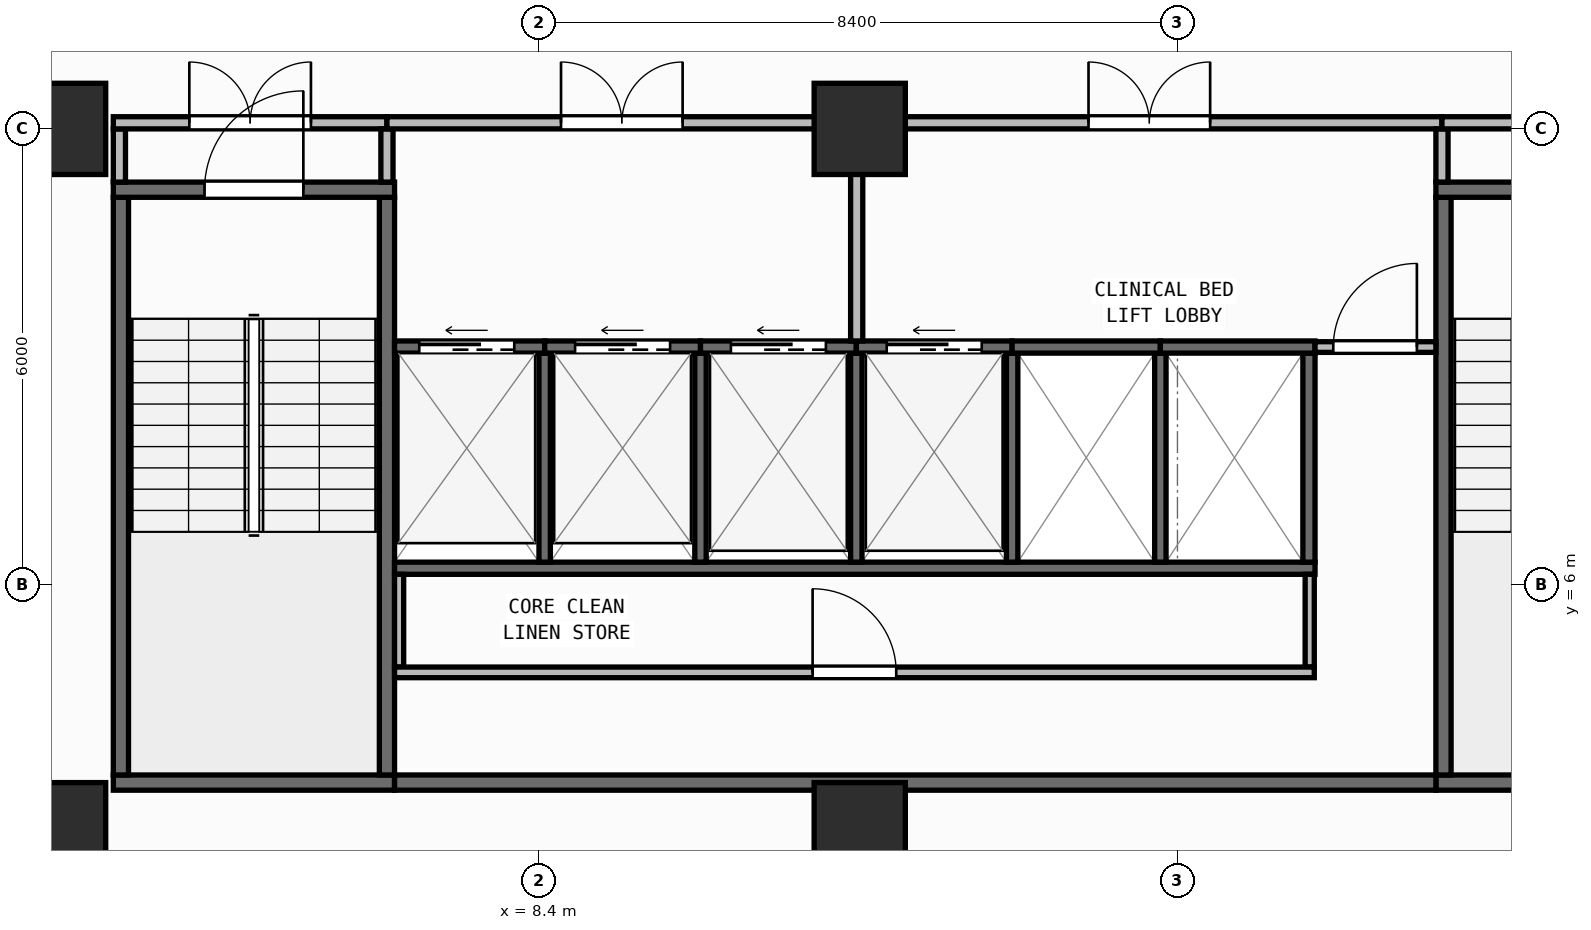
"""IFC4 building model, lengths in metres.
Left out: names, types, materials, properties, quantities, classifications, styles, units other than length and angle.
Written with IfcOpenShell. Run it as: python <this file> out.ifc"""

import sys

from ifc_helpers import new_model, si_unit, direction, frame, frame_2d, origin, origin_2d, place, context, subcontext, project, spatial, rectangle, extrude, element, fill, save


model = new_model("IFC4")
c1 = context("Model", 3, precision=1e-05, world=origin(), true_north=direction((0.0, 1.0)))
c2 = subcontext(c1, "Body", "Model", "MODEL_VIEW")
j1 = project(units=[si_unit("LENGTHUNIT", "METRE"), si_unit("PLANEANGLEUNIT", "RADIAN")], contexts=[c1])
p1 = place(None, origin())
s1 = spatial("IfcSite", under=j1, at=p1, CompositionType="ELEMENT")
p2 = place(p1, origin())
s2 = spatial("IfcBuilding", under=s1, at=p2, CompositionType="ELEMENT")
p3 = place(p2, frame((0.0, 0.0, 111.25)))
s3 = spatial("IfcBuildingStorey", under=s2, at=p3, CompositionType="ELEMENT", Elevation=111.25)
for number, where, z_axis, x_axis in (
    (1, (2.1, 2.8, 0.0), (0.0, 0.0, 1.0), (1.0, 0.0, 0.0)),
    (2, (12.62, 2.8, 0.0), (0.0, 0.0, 1.0), (1.0, 0.0, 0.0)),
    (3, (2.1, 12.0, 0.0), (0.0, 0.0, 1.0), (1.0, 0.0, 0.0)),
    (4, (12.62, 12.0, 0.0), (0.0, 0.0, 1.0), (1.0, 0.0, 0.0)),
):
    element("IfcColumn", number, at=place(p3, frame(where, z_axis=z_axis, x_axis=x_axis)), inside=s3, PredefinedType="COLUMN", context=c2, shape_type="SweptSolid", body=[
        extrude(rectangle(XDim=1.2, YDim=1.2, at=origin_2d()), origin(), (0.0, 0.0, 1.0), 3.95),
    ])
p4 = place(p3, frame((2.76, 0.173, 0.0), z_axis=(0.0, 0.0, 1.0), x_axis=(0.996857931723, 0.079210251617, 0.0)))
e5 = element("IfcWall", 5, at=p4, inside=s3, PredefinedType="STANDARD", context=c2, shape_type="SweptSolid", body=[
    extrude(rectangle(XDim=51.442, YDim=0.26, at=frame_2d((25.721, 0.0))), origin(), (0.0, 0.0, 1.0), 3.71),
])
p5 = place(p4, frame((24.521, 0.0, 0.9)))
e6 = element("IfcOpeningElement", 6, at=p5, cuts=e5, PredefinedType="OPENING", context=c2, shape_type="SweptSolid", body=[
    extrude(rectangle(XDim=2.4, YDim=1.65, at=frame_2d((1.2, 0.825))), frame((0.0, 0.14, 0.0), z_axis=(0.0, -1.0, 0.0), x_axis=(1.0, 0.0, 0.0)), (0.0, 0.0, 1.0), 0.28),
])
p6 = place(p3, frame((2.8, 3.4, 0.0), z_axis=(0.0, 0.0, 1.0), x_axis=(1.0, 0.0, 0.0)))
e7 = element("IfcWall", 7, at=p6, inside=s3, PredefinedType="SHEAR", context=c2, shape_type="SweptSolid", body=[
    extrude(rectangle(XDim=3.7, YDim=0.2, at=frame_2d((1.85, 0.0))), origin(), (0.0, 0.0, 1.0), 3.71),
])
for number, where, z_axis, x_axis in (
    (8, (2.9, 3.5, 0.0), (0.0, 0.0, 1.0), (0.0, 1.0, 0.0)),
    (9, (6.4, 3.5, 0.0), (0.0, 0.0, 1.0), (0.0, 1.0, 0.0)),
):
    element("IfcWall", number, at=place(p3, frame(where, z_axis=z_axis, x_axis=x_axis)), inside=s3, PredefinedType="SHEAR", context=c2, shape_type="SweptSolid", body=[
        extrude(rectangle(XDim=7.6, YDim=0.2, at=frame_2d((3.8, 0.0))), origin(), (0.0, 0.0, 1.0), 3.71),
    ])
p7 = place(p3, frame((2.8, 11.2, 0.0), z_axis=(0.0, 0.0, 1.0), x_axis=(1.0, 0.0, 0.0)))
e10 = element("IfcWall", 10, at=p7, inside=s3, PredefinedType="SHEAR", context=c2, shape_type="SweptSolid", body=[
    extrude(rectangle(XDim=3.7, YDim=0.2, at=frame_2d((1.85, 0.0))), origin(), (0.0, 0.0, 1.0), 3.71),
])
p8 = place(p7, frame((1.2, 0.0, 0.0)))
e11 = element("IfcOpeningElement", 11, at=p8, cuts=e10, PredefinedType="OPENING", context=c2, shape_type="SweptSolid", body=[
    extrude(rectangle(XDim=1.3, YDim=2.15, at=frame_2d((0.65, 1.075))), frame((0.0, 0.11, 0.0), z_axis=(0.0, -1.0, 0.0), x_axis=(1.0, 0.0, 0.0)), (0.0, 0.0, 1.0), 0.22),
])
p9 = place(p3, frame((20.2, 3.4, 0.0), z_axis=(0.0, 0.0, 1.0), x_axis=(1.0, 0.0, 0.0)))
e12 = element("IfcWall", 12, at=p9, inside=s3, PredefinedType="SHEAR", context=c2, shape_type="SweptSolid", body=[
    extrude(rectangle(XDim=3.7, YDim=0.2, at=frame_2d((1.85, 0.0))), origin(), (0.0, 0.0, 1.0), 3.71),
])
p10 = place(p3, frame((20.3, 3.5, 0.0), z_axis=(0.0, 0.0, 1.0), x_axis=(0.0, 1.0, 0.0)))
e13 = element("IfcWall", 13, at=p10, inside=s3, PredefinedType="SHEAR", context=c2, shape_type="SweptSolid", body=[
    extrude(rectangle(XDim=7.6, YDim=0.2, at=frame_2d((3.8, 0.0))), origin(), (0.0, 0.0, 1.0), 3.71),
])
p11 = place(p3, frame((20.2, 11.2, 0.0), z_axis=(0.0, 0.0, 1.0), x_axis=(1.0, 0.0, 0.0)))
e14 = element("IfcWall", 14, at=p11, inside=s3, PredefinedType="SHEAR", context=c2, shape_type="SweptSolid", body=[
    extrude(rectangle(XDim=3.7, YDim=0.2, at=frame_2d((1.85, 0.0))), origin(), (0.0, 0.0, 1.0), 3.71),
])
p12 = place(p11, frame((1.2, 0.0, 0.0)))
e15 = element("IfcOpeningElement", 15, at=p12, cuts=e14, PredefinedType="OPENING", context=c2, shape_type="SweptSolid", body=[
    extrude(rectangle(XDim=1.3, YDim=2.15, at=frame_2d((0.65, 1.075))), frame((0.0, 0.11, 0.0), z_axis=(0.0, -1.0, 0.0), x_axis=(1.0, 0.0, 0.0)), (0.0, 0.0, 1.0), 0.22),
])
p13 = place(p3, frame((6.5, 3.4, 0.0), z_axis=(0.0, 0.0, 1.0), x_axis=(1.0, 0.0, 0.0)))
e16 = element("IfcWall", 16, at=p13, inside=s3, PredefinedType="SHEAR", context=c2, shape_type="SweptSolid", body=[
    extrude(rectangle(XDim=13.7, YDim=0.2, at=frame_2d((6.85, 0.0))), origin(), (0.0, 0.0, 1.0), 3.71),
])
p14 = place(p3, frame((6.5, 6.22, 0.0), z_axis=(0.0, 0.0, 1.0), x_axis=(1.0, 0.0, 0.0)))
e17 = element("IfcWall", 17, at=p14, inside=s3, PredefinedType="SHEAR", context=c2, shape_type="SweptSolid", body=[
    extrude(rectangle(XDim=12.11, YDim=0.16, at=frame_2d((6.055, 0.0))), origin(), (0.0, 0.0, 1.0), 3.71),
])
p15 = place(p3, frame((18.53, 6.3, 0.0), z_axis=(0.0, 0.0, 1.0), x_axis=(0.0, 1.0, 0.0)))
e18 = element("IfcWall", 18, at=p15, inside=s3, PredefinedType="SHEAR", context=c2, shape_type="SweptSolid", body=[
    extrude(rectangle(XDim=2.75, YDim=0.16, at=frame_2d((1.375, 0.0))), origin(), (0.0, 0.0, 1.0), 3.71),
])
for number, where, z_axis, x_axis in (
    (19, (8.475, 6.3, 0.0), (0.0, 0.0, 1.0), (0.0, 1.0, 0.0)),
    (20, (10.525, 6.3, 0.0), (0.0, 0.0, 1.0), (0.0, 1.0, 0.0)),
    (21, (12.575, 6.3, 0.0), (0.0, 0.0, 1.0), (0.0, 1.0, 0.0)),
    (22, (14.625, 6.3, 0.0), (0.0, 0.0, 1.0), (0.0, 1.0, 0.0)),
    (23, (16.575, 6.3, 0.0), (0.0, 0.0, 1.0), (0.0, 1.0, 0.0)),
):
    element("IfcWall", number, at=place(p3, frame(where, z_axis=z_axis, x_axis=x_axis)), inside=s3, PredefinedType="SHEAR", context=c2, shape_type="SweptSolid", body=[
        extrude(rectangle(XDim=2.75, YDim=0.15, at=frame_2d((1.375, 0.0))), origin(), (0.0, 0.0, 1.0), 3.71),
    ])
p16 = place(p3, frame((6.5, 9.13, 0.0), z_axis=(0.0, 0.0, 1.0), x_axis=(1.0, 0.0, 0.0)))
e24 = element("IfcWall", 24, at=p16, inside=s3, PredefinedType="SHEAR", context=c2, shape_type="SweptSolid", body=[
    extrude(rectangle(XDim=1.975, YDim=0.16, at=frame_2d((0.988, 0.0))), origin(), (0.0, 0.0, 1.0), 3.71),
])
p17 = place(p16, frame((0.325, 0.0, 0.0)))
e25 = element("IfcOpeningElement", 25, at=p17, cuts=e24, PredefinedType="OPENING", context=c2, shape_type="SweptSolid", body=[
    extrude(rectangle(XDim=1.25, YDim=2.15, at=frame_2d((0.625, 1.075))), frame((0.0, 0.09, 0.0), z_axis=(0.0, -1.0, 0.0), x_axis=(1.0, 0.0, 0.0)), (0.0, 0.0, 1.0), 0.18),
])
p18 = place(p3, frame((8.475, 9.13, 0.0), z_axis=(0.0, 0.0, 1.0), x_axis=(1.0, 0.0, 0.0)))
e26 = element("IfcWall", 26, at=p18, inside=s3, PredefinedType="SHEAR", context=c2, shape_type="SweptSolid", body=[
    extrude(rectangle(XDim=2.05, YDim=0.16, at=frame_2d((1.025, 0.0))), origin(), (0.0, 0.0, 1.0), 3.71),
])
p19 = place(p18, frame((0.4, 0.0, 0.0)))
e27 = element("IfcOpeningElement", 27, at=p19, cuts=e26, PredefinedType="OPENING", context=c2, shape_type="SweptSolid", body=[
    extrude(rectangle(XDim=1.25, YDim=2.15, at=frame_2d((0.625, 1.075))), frame((0.0, 0.09, 0.0), z_axis=(0.0, -1.0, 0.0), x_axis=(1.0, 0.0, 0.0)), (0.0, 0.0, 1.0), 0.18),
])
p20 = place(p3, frame((10.525, 9.13, 0.0), z_axis=(0.0, 0.0, 1.0), x_axis=(1.0, 0.0, 0.0)))
e28 = element("IfcWall", 28, at=p20, inside=s3, PredefinedType="SHEAR", context=c2, shape_type="SweptSolid", body=[
    extrude(rectangle(XDim=2.05, YDim=0.16, at=frame_2d((1.025, 0.0))), origin(), (0.0, 0.0, 1.0), 3.71),
])
p21 = place(p20, frame((0.4, 0.0, 0.0)))
e29 = element("IfcOpeningElement", 29, at=p21, cuts=e28, PredefinedType="OPENING", context=c2, shape_type="SweptSolid", body=[
    extrude(rectangle(XDim=1.25, YDim=2.15, at=frame_2d((0.625, 1.075))), frame((0.0, 0.09, 0.0), z_axis=(0.0, -1.0, 0.0), x_axis=(1.0, 0.0, 0.0)), (0.0, 0.0, 1.0), 0.18),
])
p22 = place(p3, frame((12.575, 9.13, 0.0), z_axis=(0.0, 0.0, 1.0), x_axis=(1.0, 0.0, 0.0)))
e30 = element("IfcWall", 30, at=p22, inside=s3, PredefinedType="SHEAR", context=c2, shape_type="SweptSolid", body=[
    extrude(rectangle(XDim=2.05, YDim=0.16, at=frame_2d((1.025, 0.0))), origin(), (0.0, 0.0, 1.0), 3.71),
])
p23 = place(p22, frame((0.4, 0.0, 0.0)))
e31 = element("IfcOpeningElement", 31, at=p23, cuts=e30, PredefinedType="OPENING", context=c2, shape_type="SweptSolid", body=[
    extrude(rectangle(XDim=1.25, YDim=2.15, at=frame_2d((0.625, 1.075))), frame((0.0, 0.09, 0.0), z_axis=(0.0, -1.0, 0.0), x_axis=(1.0, 0.0, 0.0)), (0.0, 0.0, 1.0), 0.18),
])
p24 = place(p3, frame((14.625, 9.13, 0.0), z_axis=(0.0, 0.0, 1.0), x_axis=(1.0, 0.0, 0.0)))
e32 = element("IfcWall", 32, at=p24, inside=s3, PredefinedType="SHEAR", context=c2, shape_type="SweptSolid", body=[
    extrude(rectangle(XDim=1.95, YDim=0.16, at=frame_2d((0.975, 0.0))), origin(), (0.0, 0.0, 1.0), 3.71),
])
p25 = place(p3, frame((16.575, 9.13, 0.0), z_axis=(0.0, 0.0, 1.0), x_axis=(1.0, 0.0, 0.0)))
e33 = element("IfcWall", 33, at=p25, inside=s3, PredefinedType="SHEAR", context=c2, shape_type="SweptSolid", body=[
    extrude(rectangle(XDim=2.035, YDim=0.16, at=frame_2d((1.018, 0.0))), origin(), (0.0, 0.0, 1.0), 3.71),
])
for number, where, z_axis, x_axis in (
    (34, (6.56, 4.92, 0.0), (0.0, 0.0, 1.0), (0.0, 1.0, 0.0)),
    (35, (18.54, 4.92, 0.0), (0.0, 0.0, 1.0), (0.0, 1.0, 0.0)),
):
    element("IfcWall", number, at=place(p3, frame(where, z_axis=z_axis, x_axis=x_axis)), inside=s3, PredefinedType="PARTITIONING", context=c2, shape_type="SweptSolid", body=[
        extrude(rectangle(XDim=1.22, YDim=0.12, at=frame_2d((0.61, 0.0))), origin(), (0.0, 0.0, 1.0), 3.71),
    ])
p26 = place(p3, frame((6.5, 4.85, 0.0), z_axis=(0.0, 0.0, 1.0), x_axis=(1.0, 0.0, 0.0)))
e36 = element("IfcWall", 36, at=p26, inside=s3, PredefinedType="PARTITIONING", context=c2, shape_type="SweptSolid", body=[
    extrude(rectangle(XDim=12.1, YDim=0.14, at=frame_2d((6.05, 0.0))), origin(), (0.0, 0.0, 1.0), 3.71),
])
p27 = place(p26, frame((5.5, 0.0, 0.0)))
e37 = element("IfcOpeningElement", 37, at=p27, cuts=e36, PredefinedType="OPENING", context=c2, shape_type="SweptSolid", body=[
    extrude(rectangle(XDim=1.1, YDim=2.1, at=frame_2d((0.55, 1.05))), frame((0.0, 0.08, 0.0), z_axis=(0.0, -1.0, 0.0), x_axis=(1.0, 0.0, 0.0)), (0.0, 0.0, 1.0), 0.16),
])
p28 = place(p3, frame((18.61, 9.13, 0.0), z_axis=(0.0, 0.0, 1.0), x_axis=(1.0, 0.0, 0.0)))
e38 = element("IfcWall", 38, at=p28, inside=s3, PredefinedType="PARTITIONING", context=c2, shape_type="SweptSolid", body=[
    extrude(rectangle(XDim=1.59, YDim=0.14, at=frame_2d((0.795, 0.0))), origin(), (0.0, 0.0, 1.0), 3.71),
])
p29 = place(p28, frame((0.24, 0.0, 0.0)))
e39 = element("IfcOpeningElement", 39, at=p29, cuts=e38, PredefinedType="OPENING", context=c2, shape_type="SweptSolid", body=[
    extrude(rectangle(XDim=1.1, YDim=2.1, at=frame_2d((0.55, 1.05))), frame((0.0, 0.08, 0.0), z_axis=(0.0, -1.0, 0.0), x_axis=(1.0, 0.0, 0.0)), (0.0, 0.0, 1.0), 0.16),
])
p30 = place(p3, frame((2.88, 11.3, 0.0), z_axis=(0.0, 0.0, 1.0), x_axis=(0.0, 1.0, 0.0)))
e40 = element("IfcWall", 40, at=p30, inside=s3, PredefinedType="PARTITIONING", context=c2, shape_type="SweptSolid", body=[
    extrude(rectangle(XDim=0.7, YDim=0.16, at=frame_2d((0.35, 0.0))), origin(), (0.0, 0.0, 1.0), 3.71),
])
p31 = place(p3, frame((2.8, 12.08, 0.0), z_axis=(0.0, 0.0, 1.0), x_axis=(1.0, 0.0, 0.0)))
e41 = element("IfcWall", 41, at=p31, inside=s3, PredefinedType="PARTITIONING", context=c2, shape_type="SweptSolid", body=[
    extrude(rectangle(XDim=3.6, YDim=0.16, at=frame_2d((1.8, 0.0))), origin(), (0.0, 0.0, 1.0), 3.083),
])
p32 = place(p31, frame((1.0, 0.0, 0.0)))
e42 = element("IfcOpeningElement", 42, at=p32, cuts=e41, PredefinedType="OPENING", context=c2, shape_type="SweptSolid", body=[
    extrude(rectangle(XDim=1.6, YDim=2.05, at=frame_2d((0.8, 1.025))), frame((0.0, 0.09, 0.0), z_axis=(0.0, -1.0, 0.0), x_axis=(1.0, 0.0, 0.0)), (0.0, 0.0, 1.0), 0.18),
])
p33 = place(p3, frame((6.4, 11.3, 0.0), z_axis=(0.0, 0.0, 1.0), x_axis=(0.0, 1.0, 0.0)))
e43 = element("IfcWall", 43, at=p33, inside=s3, PredefinedType="PARTITIONING", context=c2, shape_type="SweptSolid", body=[
    extrude(rectangle(XDim=0.7, YDim=0.16, at=frame_2d((0.35, 0.0))), origin(), (0.0, 0.0, 1.0), 3.71),
])
p34 = place(p3, frame((6.4, 12.08, 0.0), z_axis=(0.0, 0.0, 1.0), x_axis=(1.0, 0.0, 0.0)))
e44 = element("IfcWall", 44, at=p34, inside=s3, PredefinedType="PARTITIONING", context=c2, shape_type="SweptSolid", body=[
    extrude(rectangle(XDim=6.18, YDim=0.16, at=frame_2d((3.09, 0.0))), origin(), (0.0, 0.0, 1.0), 3.083),
])
p35 = place(p34, frame((2.29, 0.0, 0.0)))
e45 = element("IfcOpeningElement", 45, at=p35, cuts=e44, PredefinedType="OPENING", context=c2, shape_type="SweptSolid", body=[
    extrude(rectangle(XDim=1.6, YDim=2.05, at=frame_2d((0.8, 1.025))), frame((0.0, 0.09, 0.0), z_axis=(0.0, -1.0, 0.0), x_axis=(1.0, 0.0, 0.0)), (0.0, 0.0, 1.0), 0.18),
])
p36 = place(p3, frame((12.58, 9.21, 0.0), z_axis=(0.0, 0.0, 1.0), x_axis=(0.0, 1.0, 0.0)))
e46 = element("IfcWall", 46, at=p36, inside=s3, PredefinedType="PARTITIONING", context=c2, shape_type="SweptSolid", body=[
    extrude(rectangle(XDim=2.79, YDim=0.16, at=frame_2d((1.395, 0.0))), origin(), (0.0, 0.0, 1.0), 3.71),
])
p37 = place(p3, frame((12.58, 12.08, 0.0), z_axis=(0.0, 0.0, 1.0), x_axis=(1.0, 0.0, 0.0)))
e47 = element("IfcWall", 47, at=p37, inside=s3, PredefinedType="PARTITIONING", context=c2, shape_type="SweptSolid", body=[
    extrude(rectangle(XDim=7.7, YDim=0.16, at=frame_2d((3.85, 0.0))), origin(), (0.0, 0.0, 1.0), 3.083),
])
p38 = place(p37, frame((3.05, 0.0, 0.0)))
e48 = element("IfcOpeningElement", 48, at=p38, cuts=e47, PredefinedType="OPENING", context=c2, shape_type="SweptSolid", body=[
    extrude(rectangle(XDim=1.6, YDim=2.05, at=frame_2d((0.8, 1.025))), frame((0.0, 0.09, 0.0), z_axis=(0.0, -1.0, 0.0), x_axis=(1.0, 0.0, 0.0)), (0.0, 0.0, 1.0), 0.18),
])
p39 = place(p3, frame((20.28, 11.3, 0.0), z_axis=(0.0, 0.0, 1.0), x_axis=(0.0, 1.0, 0.0)))
e49 = element("IfcWall", 49, at=p39, inside=s3, PredefinedType="PARTITIONING", context=c2, shape_type="SweptSolid", body=[
    extrude(rectangle(XDim=0.7, YDim=0.16, at=frame_2d((0.35, 0.0))), origin(), (0.0, 0.0, 1.0), 3.71),
])
p40 = place(p3, frame((20.28, 12.08, 0.0), z_axis=(0.0, 0.0, 1.0), x_axis=(1.0, 0.0, 0.0)))
e50 = element("IfcWall", 50, at=p40, inside=s3, PredefinedType="PARTITIONING", context=c2, shape_type="SweptSolid", body=[
    extrude(rectangle(XDim=3.62, YDim=0.16, at=frame_2d((1.81, 0.0))), origin(), (0.0, 0.0, 1.0), 3.083),
])
p41 = place(p40, frame((1.01, 0.0, 0.0)))
e51 = element("IfcOpeningElement", 51, at=p41, cuts=e50, PredefinedType="OPENING", context=c2, shape_type="SweptSolid", body=[
    extrude(rectangle(XDim=1.6, YDim=2.05, at=frame_2d((0.8, 1.025))), frame((0.0, 0.09, 0.0), z_axis=(0.0, -1.0, 0.0), x_axis=(1.0, 0.0, 0.0)), (0.0, 0.0, 1.0), 0.18),
])
p42 = place(p8, origin())
e52 = element("IfcDoor", 52, at=p42, inside=s3, OperationType="SINGLE_SWING_RIGHT", PredefinedType="DOOR", context=c2, shape_type="SweptSolid", body=[
    extrude(rectangle(XDim=1.3, YDim=2.15, at=frame_2d((0.65, 1.075))), frame((0.0, 0.025, 0.0), z_axis=(0.0, -1.0, 0.0), x_axis=(1.0, 0.0, 0.0)), (0.0, 0.0, 1.0), 0.05),
])
fill(e11, e52)
p43 = place(p17, origin())
e53 = element("IfcDoor", 53, at=p43, inside=s3, OperationType="SLIDING_TO_LEFT", PredefinedType="DOOR", context=c2, shape_type="SweptSolid", body=[
    extrude(rectangle(XDim=1.25, YDim=2.15, at=frame_2d((0.625, 1.075))), frame((0.0, 0.025, 0.0), z_axis=(0.0, -1.0, 0.0), x_axis=(1.0, 0.0, 0.0)), (0.0, 0.0, 1.0), 0.05),
])
fill(e25, e53)
p44 = place(p19, origin())
e54 = element("IfcDoor", 54, at=p44, inside=s3, OperationType="SLIDING_TO_LEFT", PredefinedType="DOOR", context=c2, shape_type="SweptSolid", body=[
    extrude(rectangle(XDim=1.25, YDim=2.15, at=frame_2d((0.625, 1.075))), frame((0.0, 0.025, 0.0), z_axis=(0.0, -1.0, 0.0), x_axis=(1.0, 0.0, 0.0)), (0.0, 0.0, 1.0), 0.05),
])
fill(e27, e54)
p45 = place(p21, origin())
e55 = element("IfcDoor", 55, at=p45, inside=s3, OperationType="SLIDING_TO_LEFT", PredefinedType="DOOR", context=c2, shape_type="SweptSolid", body=[
    extrude(rectangle(XDim=1.25, YDim=2.15, at=frame_2d((0.625, 1.075))), frame((0.0, 0.025, 0.0), z_axis=(0.0, -1.0, 0.0), x_axis=(1.0, 0.0, 0.0)), (0.0, 0.0, 1.0), 0.05),
])
fill(e29, e55)
p46 = place(p23, origin())
e56 = element("IfcDoor", 56, at=p46, inside=s3, OperationType="SLIDING_TO_LEFT", PredefinedType="DOOR", context=c2, shape_type="SweptSolid", body=[
    extrude(rectangle(XDim=1.25, YDim=2.15, at=frame_2d((0.625, 1.075))), frame((0.0, 0.025, 0.0), z_axis=(0.0, -1.0, 0.0), x_axis=(1.0, 0.0, 0.0)), (0.0, 0.0, 1.0), 0.05),
])
fill(e31, e56)
p47 = place(p27, origin())
e57 = element("IfcDoor", 57, at=p47, inside=s3, OperationType="SINGLE_SWING_LEFT", PredefinedType="DOOR", context=c2, shape_type="SweptSolid", body=[
    extrude(rectangle(XDim=1.1, YDim=2.1, at=frame_2d((0.55, 1.05))), frame((0.0, 0.025, 0.0), z_axis=(0.0, -1.0, 0.0), x_axis=(1.0, 0.0, 0.0)), (0.0, 0.0, 1.0), 0.05),
])
fill(e37, e57)
p48 = place(p29, origin())
e58 = element("IfcDoor", 58, at=p48, inside=s3, OperationType="SINGLE_SWING_RIGHT", PredefinedType="DOOR", context=c2, shape_type="SweptSolid", body=[
    extrude(rectangle(XDim=1.1, YDim=2.1, at=frame_2d((0.55, 1.05))), frame((0.0, 0.025, 0.0), z_axis=(0.0, -1.0, 0.0), x_axis=(1.0, 0.0, 0.0)), (0.0, 0.0, 1.0), 0.05),
])
fill(e39, e58)
p49 = place(p32, origin())
e59 = element("IfcDoor", 59, at=p49, inside=s3, OperationType="DOUBLE_DOOR_SINGLE_SWING", PredefinedType="DOOR", context=c2, shape_type="SweptSolid", body=[
    extrude(rectangle(XDim=1.6, YDim=2.05, at=frame_2d((0.8, 1.025))), frame((0.0, 0.025, 0.0), z_axis=(0.0, -1.0, 0.0), x_axis=(1.0, 0.0, 0.0)), (0.0, 0.0, 1.0), 0.05),
])
fill(e42, e59)
p50 = place(p35, origin())
e60 = element("IfcDoor", 60, at=p50, inside=s3, OperationType="DOUBLE_DOOR_SINGLE_SWING", PredefinedType="DOOR", context=c2, shape_type="SweptSolid", body=[
    extrude(rectangle(XDim=1.6, YDim=2.05, at=frame_2d((0.8, 1.025))), frame((0.0, 0.025, 0.0), z_axis=(0.0, -1.0, 0.0), x_axis=(1.0, 0.0, 0.0)), (0.0, 0.0, 1.0), 0.05),
])
fill(e45, e60)
p51 = place(p38, origin())
e61 = element("IfcDoor", 61, at=p51, inside=s3, OperationType="DOUBLE_DOOR_SINGLE_SWING", PredefinedType="DOOR", context=c2, shape_type="SweptSolid", body=[
    extrude(rectangle(XDim=1.6, YDim=2.05, at=frame_2d((0.8, 1.025))), frame((0.0, 0.025, 0.0), z_axis=(0.0, -1.0, 0.0), x_axis=(1.0, 0.0, 0.0)), (0.0, 0.0, 1.0), 0.05),
])
fill(e48, e61)
save(model, sys.argv[1])
